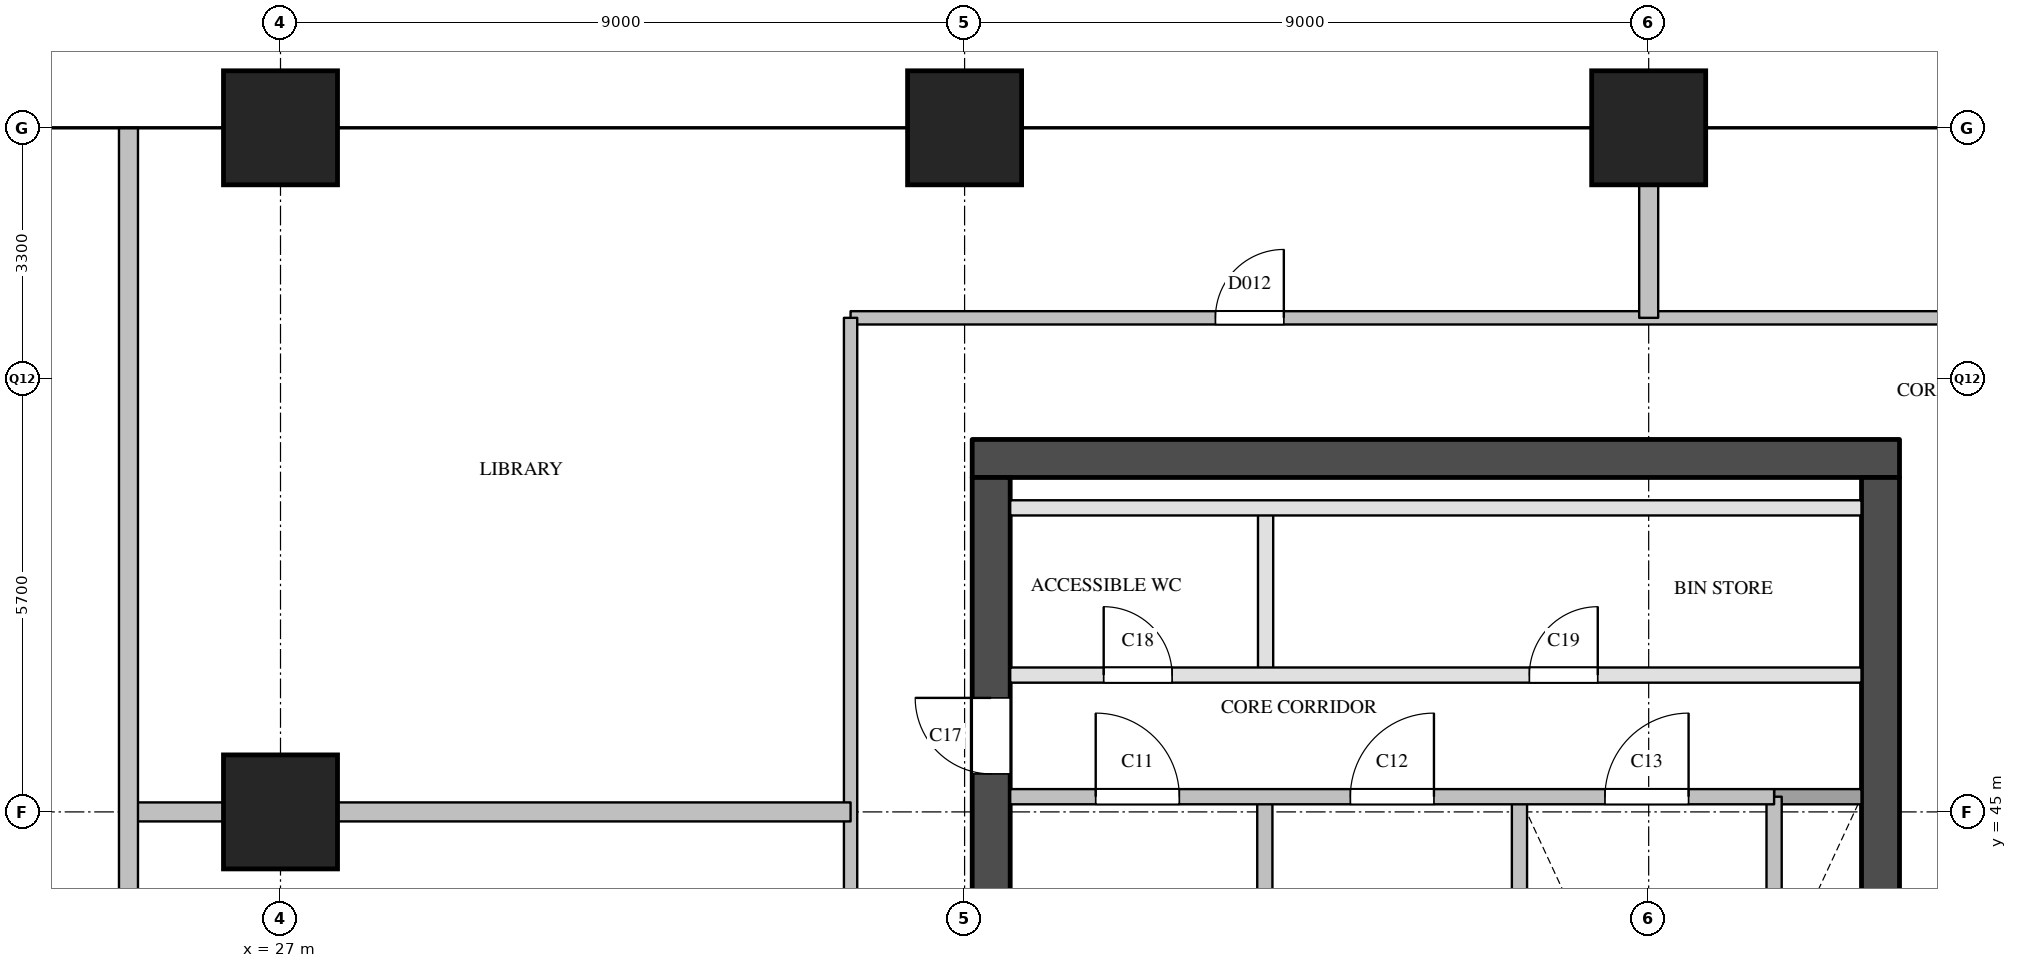
"""IFC4 building model, lengths in metres.
Left out: names, types, materials, properties, quantities, classifications, styles, units other than length and angle.
Written with IfcOpenShell. Run it as: python <this file> out.ifc"""

import sys

from ifc_helpers import new_model, si_unit, direction, frame, frame_2d, origin, origin_2d, place, context, subcontext, project, spatial, rectangle, extrude, element, fill, save


model = new_model("IFC4")
c1 = context("Model", 3, precision=1e-05, world=origin(), true_north=direction((0.0, 1.0)))
c2 = subcontext(c1, "Body", "Model", "MODEL_VIEW")
j1 = project(units=[si_unit("LENGTHUNIT", "METRE"), si_unit("PLANEANGLEUNIT", "RADIAN")], contexts=[c1])
p1 = place(None, origin())
s1 = spatial("IfcSite", under=j1, at=p1, CompositionType="ELEMENT")
p2 = place(p1, origin())
s2 = spatial("IfcBuilding", under=s1, at=p2, CompositionType="ELEMENT")
p3 = place(p2, frame((0.0, 0.0, 177.8)))
s3 = spatial("IfcBuildingStorey", under=s2, at=p3, CompositionType="ELEMENT", Elevation=177.8)
for number, where, z_axis, x_axis in (
    (1, (27.0, 45.0, 0.0), (0.0, 0.0, 1.0), (1.0, 0.0, 0.0)),
    (2, (27.0, 54.0, 0.0), (0.0, 0.0, 1.0), (1.0, 0.0, 0.0)),
    (3, (36.0, 54.0, 0.0), (0.0, 0.0, 1.0), (1.0, 0.0, 0.0)),
    (4, (45.0, 54.0, 0.0), (0.0, 0.0, 1.0), (1.0, 0.0, 0.0)),
):
    element("IfcColumn", number, at=place(p3, frame(where, z_axis=z_axis, x_axis=x_axis)), inside=s3, PredefinedType="COLUMN", context=c2, shape_type="SweptSolid", body=[
        extrude(rectangle(XDim=1.5, YDim=1.5, at=origin_2d()), origin(), (0.0, 0.0, 1.0), 3.9),
    ])
p4 = place(p3, frame((36.1, 49.65, 0.0), z_axis=(0.0, 0.0, 1.0), x_axis=(1.0, 0.0, 0.0)))
e5 = element("IfcWall", 5, at=p4, inside=s3, PredefinedType="SHEAR", context=c2, shape_type="SweptSolid", body=[
    extrude(rectangle(XDim=12.2, YDim=0.5, at=frame_2d((6.1, 0.0))), origin(), (0.0, 0.0, 1.0), 3.6),
])
p5 = place(p3, frame((36.35, 29.1, 0.0), z_axis=(0.0, 0.0, 1.0), x_axis=(0.0, 1.0, 0.0)))
e6 = element("IfcWall", 6, at=p5, inside=s3, PredefinedType="SHEAR", context=c2, shape_type="SweptSolid", body=[
    extrude(rectangle(XDim=20.3, YDim=0.5, at=frame_2d((10.15, 0.0))), origin(), (0.0, 0.0, 1.0), 3.6),
])
p6 = place(p5, frame((3.6, 0.0, 0.0)))
e7 = element("IfcOpeningElement", 7, at=p6, cuts=e6, PredefinedType="OPENING", context=c2, shape_type="SweptSolid", body=[
    extrude(rectangle(XDim=1.8, YDim=2.1, at=frame_2d((0.9, 1.05))), frame((0.0, 0.26, 0.0), z_axis=(0.0, -1.0, 0.0), x_axis=(1.0, 0.0, 0.0)), (0.0, 0.0, 1.0), 0.52),
])
p7 = place(p5, frame((16.4, 0.0, 0.0)))
e8 = element("IfcOpeningElement", 8, at=p7, cuts=e6, PredefinedType="OPENING", context=c2, shape_type="SweptSolid", body=[
    extrude(rectangle(XDim=1.0, YDim=2.1, at=frame_2d((0.5, 1.05))), frame((0.0, 0.26, 0.0), z_axis=(0.0, -1.0, 0.0), x_axis=(1.0, 0.0, 0.0)), (0.0, 0.0, 1.0), 0.52),
])
p8 = place(p3, frame((48.05, 29.1, 0.0), z_axis=(0.0, 0.0, 1.0), x_axis=(0.0, 1.0, 0.0)))
e9 = element("IfcWall", 9, at=p8, inside=s3, PredefinedType="SHEAR", context=c2, shape_type="SweptSolid", body=[
    extrude(rectangle(XDim=20.3, YDim=0.5, at=frame_2d((10.15, 0.0))), origin(), (0.0, 0.0, 1.0), 3.6),
])
p9 = place(p8, frame((12.5, 0.0, 0.0)))
e10 = element("IfcOpeningElement", 10, at=p9, cuts=e9, PredefinedType="OPENING", context=c2, shape_type="SweptSolid", body=[
    extrude(rectangle(XDim=0.7, YDim=2.1, at=frame_2d((0.35, 1.05))), frame((0.0, 0.26, 0.0), z_axis=(0.0, -1.0, 0.0), x_axis=(1.0, 0.0, 0.0)), (0.0, 0.0, 1.0), 0.52),
])
p10 = place(p8, frame((3.9, 0.0, 0.0)))
e11 = element("IfcOpeningElement", 11, at=p10, cuts=e9, PredefinedType="OPENING", context=c2, shape_type="SweptSolid", body=[
    extrude(rectangle(XDim=1.8, YDim=2.1, at=frame_2d((0.9, 1.05))), frame((0.0, 0.26, 0.0), z_axis=(0.0, -1.0, 0.0), x_axis=(1.0, 0.0, 0.0)), (0.0, 0.0, 1.0), 0.52),
])
p11 = place(p3, frame((39.95, 40.78, 0.0), z_axis=(0.0, 0.0, 1.0), x_axis=(0.0, 1.0, 0.0)))
e12 = element("IfcWall", 12, at=p11, inside=s3, PredefinedType="SOLIDWALL", context=c2, shape_type="SweptSolid", body=[
    extrude(rectangle(XDim=4.42, YDim=0.2, at=frame_2d((2.21, 0.0))), origin(), (0.0, 0.0, 1.0), 3.6),
])
p12 = place(p3, frame((39.96, 46.8, 0.0), z_axis=(0.0, 0.0, 1.0), x_axis=(0.0, 1.0, 0.0)))
e13 = element("IfcWall", 13, at=p12, inside=s3, PredefinedType="PARTITIONING", context=c2, shape_type="SweptSolid", body=[
    extrude(rectangle(XDim=2.2, YDim=0.2, at=frame_2d((1.1, 0.0))), origin(), (0.0, 0.0, 1.0), 3.6),
])
for number, where, z_axis, x_axis in (
    (14, (43.3, 40.78, 0.0), (0.0, 0.0, 1.0), (0.0, 1.0, 0.0)),
    (15, (46.65, 40.78, 0.0), (0.0, 0.0, 1.0), (0.0, 1.0, 0.0)),
):
    element("IfcWall", number, at=place(p3, frame(where, z_axis=z_axis, x_axis=x_axis)), inside=s3, PredefinedType="SOLIDWALL", context=c2, shape_type="SweptSolid", body=[
        extrude(rectangle(XDim=4.42, YDim=0.2, at=frame_2d((2.21, 0.0))), origin(), (0.0, 0.0, 1.0), 3.6),
    ])
p13 = place(p3, frame((46.65, 45.2, 0.0), z_axis=(0.0, 0.0, 1.0), x_axis=(1.0, 0.0, 0.0)))
e16 = element("IfcWall", 16, at=p13, inside=s3, PredefinedType="SOLIDWALL", context=c2, shape_type="SweptSolid", body=[
    extrude(rectangle(XDim=1.15, YDim=0.2, at=frame_2d((0.575, 0.0))), origin(), (0.0, 0.0, 1.0), 3.6),
])
p14 = place(p3, frame((36.6, 45.2, 0.0), z_axis=(0.0, 0.0, 1.0), x_axis=(1.0, 0.0, 0.0)))
e17 = element("IfcWall", 17, at=p14, inside=s3, PredefinedType="SOLIDWALL", context=c2, shape_type="SweptSolid", body=[
    extrude(rectangle(XDim=10.05, YDim=0.2, at=frame_2d((5.025, 0.0))), origin(), (0.0, 0.0, 1.0), 3.6),
])
p15 = place(p14, frame((1.125, 0.0, 0.0)))
e18 = element("IfcOpeningElement", 18, at=p15, cuts=e17, PredefinedType="OPENING", context=c2, shape_type="SweptSolid", body=[
    extrude(rectangle(XDim=1.1, YDim=2.1, at=frame_2d((0.55, 1.05))), frame((0.0, 0.11, 0.0), z_axis=(0.0, -1.0, 0.0), x_axis=(1.0, 0.0, 0.0)), (0.0, 0.0, 1.0), 0.22),
])
p16 = place(p14, frame((4.475, 0.0, 0.0)))
e19 = element("IfcOpeningElement", 19, at=p16, cuts=e17, PredefinedType="OPENING", context=c2, shape_type="SweptSolid", body=[
    extrude(rectangle(XDim=1.1, YDim=2.1, at=frame_2d((0.55, 1.05))), frame((0.0, 0.11, 0.0), z_axis=(0.0, -1.0, 0.0), x_axis=(1.0, 0.0, 0.0)), (0.0, 0.0, 1.0), 0.22),
])
p17 = place(p14, frame((7.825, 0.0, 0.0)))
e20 = element("IfcOpeningElement", 20, at=p17, cuts=e17, PredefinedType="OPENING", context=c2, shape_type="SweptSolid", body=[
    extrude(rectangle(XDim=1.1, YDim=2.1, at=frame_2d((0.55, 1.05))), frame((0.0, 0.11, 0.0), z_axis=(0.0, -1.0, 0.0), x_axis=(1.0, 0.0, 0.0)), (0.0, 0.0, 1.0), 0.22),
])
p18 = place(p3, frame((36.6, 46.8, 0.0), z_axis=(0.0, 0.0, 1.0), x_axis=(1.0, 0.0, 0.0)))
e21 = element("IfcWall", 21, at=p18, inside=s3, PredefinedType="PARTITIONING", context=c2, shape_type="SweptSolid", body=[
    extrude(rectangle(XDim=11.2, YDim=0.2, at=frame_2d((5.6, 0.0))), origin(), (0.0, 0.0, 1.0), 3.6),
])
p19 = place(p18, frame((1.23, 0.0, 0.0)))
e22 = element("IfcOpeningElement", 22, at=p19, cuts=e21, PredefinedType="OPENING", context=c2, shape_type="SweptSolid", body=[
    extrude(rectangle(XDim=0.9, YDim=2.1, at=frame_2d((0.45, 1.05))), frame((0.0, 0.11, 0.0), z_axis=(0.0, -1.0, 0.0), x_axis=(1.0, 0.0, 0.0)), (0.0, 0.0, 1.0), 0.22),
])
p20 = place(p18, frame((6.83, 0.0, 0.0)))
e23 = element("IfcOpeningElement", 23, at=p20, cuts=e21, PredefinedType="OPENING", context=c2, shape_type="SweptSolid", body=[
    extrude(rectangle(XDim=0.9, YDim=2.1, at=frame_2d((0.45, 1.05))), frame((0.0, 0.11, 0.0), z_axis=(0.0, -1.0, 0.0), x_axis=(1.0, 0.0, 0.0)), (0.0, 0.0, 1.0), 0.22),
])
p21 = place(p3, frame((36.6, 49.0, 0.0), z_axis=(0.0, 0.0, 1.0), x_axis=(1.0, 0.0, 0.0)))
e24 = element("IfcWall", 24, at=p21, inside=s3, PredefinedType="PARTITIONING", context=c2, shape_type="SweptSolid", body=[
    extrude(rectangle(XDim=11.2, YDim=0.2, at=frame_2d((5.6, 0.0))), origin(), (0.0, 0.0, 1.0), 3.6),
])
p22 = place(p3, frame((34.5, 51.5, 0.0), z_axis=(0.0, 0.0, 1.0), x_axis=(1.0, 0.0, 0.0)))
e25 = element("IfcWall", 25, at=p22, inside=s3, PredefinedType="PARTITIONING", context=c2, shape_type="SweptSolid", body=[
    extrude(rectangle(XDim=15.4, YDim=0.175, at=frame_2d((7.7, 0.0))), origin(), (0.0, 0.0, 1.0), 3.6),
])
p23 = place(p22, frame((4.8, 0.0, 0.0)))
e26 = element("IfcOpeningElement", 26, at=p23, cuts=e25, PredefinedType="OPENING", context=c2, shape_type="SweptSolid", body=[
    extrude(rectangle(XDim=0.9, YDim=2.1, at=frame_2d((0.45, 1.05))), frame((0.0, 0.097, 0.0), z_axis=(0.0, -1.0, 0.0), x_axis=(1.0, 0.0, 0.0)), (0.0, 0.0, 1.0), 0.195),
])
p24 = place(p3, frame((34.5, 28.5, 0.0), z_axis=(0.0, 0.0, 1.0), x_axis=(0.0, 1.0, 0.0)))
e27 = element("IfcWall", 27, at=p24, inside=s3, PredefinedType="PARTITIONING", context=c2, shape_type="SweptSolid", body=[
    extrude(rectangle(XDim=23.0, YDim=0.175, at=frame_2d((11.5, 0.0))), origin(), (0.0, 0.0, 1.0), 3.6),
])
p25 = place(p24, frame((5.1, 0.0, 0.0)))
e28 = element("IfcOpeningElement", 28, at=p25, cuts=e27, PredefinedType="OPENING", context=c2, shape_type="SweptSolid", body=[
    extrude(rectangle(XDim=1.0, YDim=2.1, at=frame_2d((0.5, 1.05))), frame((0.0, 0.097, 0.0), z_axis=(0.0, -1.0, 0.0), x_axis=(1.0, 0.0, 0.0)), (0.0, 0.0, 1.0), 0.195),
])
p26 = place(p24, frame((11.0, 0.0, 0.0)))
e29 = element("IfcOpeningElement", 29, at=p26, cuts=e27, PredefinedType="OPENING", context=c2, shape_type="SweptSolid", body=[
    extrude(rectangle(XDim=1.0, YDim=2.1, at=frame_2d((0.5, 1.05))), frame((0.0, 0.097, 0.0), z_axis=(0.0, -1.0, 0.0), x_axis=(1.0, 0.0, 0.0)), (0.0, 0.0, 1.0), 0.195),
])
p27 = place(p3, frame((25.0, 45.0, 0.0), z_axis=(0.0, 0.0, 1.0), x_axis=(1.0, 0.0, 0.0)))
e30 = element("IfcWall", 30, at=p27, inside=s3, PredefinedType="PARTITIONING", context=c2, shape_type="SweptSolid", body=[
    extrude(rectangle(XDim=9.5, YDim=0.25, at=frame_2d((4.75, 0.0))), origin(), (0.0, 0.0, 1.0), 3.6),
])
p28 = place(p3, frame((25.0, 27.0, 0.0), z_axis=(0.0, 0.0, 1.0), x_axis=(0.0, 1.0, 0.0)))
e31 = element("IfcWall", 31, at=p28, inside=s3, PredefinedType="PARTITIONING", context=c2, shape_type="SweptSolid", body=[
    extrude(rectangle(XDim=27.0, YDim=0.25, at=frame_2d((13.5, 0.0))), origin(), (0.0, 0.0, 1.0), 2.6),
])
p29 = place(p3, frame((45.0, 51.5, 0.0), z_axis=(0.0, 0.0, 1.0), x_axis=(0.0, 1.0, 0.0)))
e32 = element("IfcWall", 32, at=p29, inside=s3, PredefinedType="PARTITIONING", context=c2, shape_type="SweptSolid", body=[
    extrude(rectangle(XDim=2.5, YDim=0.25, at=frame_2d((1.25, 0.0))), origin(), (0.0, 0.0, 1.0), 3.6),
])
p30 = place(p15, origin())
e33 = element("IfcDoor", 33, at=p30, inside=s3, OperationType="SINGLE_SWING_LEFT", PredefinedType="DOOR", context=c2, shape_type="SweptSolid", body=[
    extrude(rectangle(XDim=1.1, YDim=2.1, at=frame_2d((0.55, 1.05))), frame((0.0, 0.025, 0.0), z_axis=(0.0, -1.0, 0.0), x_axis=(1.0, 0.0, 0.0)), (0.0, 0.0, 1.0), 0.05),
])
fill(e18, e33)
p31 = place(p16, origin())
e34 = element("IfcDoor", 34, at=p31, inside=s3, OperationType="SINGLE_SWING_RIGHT", PredefinedType="DOOR", context=c2, shape_type="SweptSolid", body=[
    extrude(rectangle(XDim=1.1, YDim=2.1, at=frame_2d((0.55, 1.05))), frame((0.0, 0.025, 0.0), z_axis=(0.0, -1.0, 0.0), x_axis=(1.0, 0.0, 0.0)), (0.0, 0.0, 1.0), 0.05),
])
fill(e19, e34)
p32 = place(p17, origin())
e35 = element("IfcDoor", 35, at=p32, inside=s3, OperationType="SINGLE_SWING_RIGHT", PredefinedType="DOOR", context=c2, shape_type="SweptSolid", body=[
    extrude(rectangle(XDim=1.1, YDim=2.1, at=frame_2d((0.55, 1.05))), frame((0.0, 0.025, 0.0), z_axis=(0.0, -1.0, 0.0), x_axis=(1.0, 0.0, 0.0)), (0.0, 0.0, 1.0), 0.05),
])
fill(e20, e35)
p33 = place(p7, origin())
e36 = element("IfcDoor", 36, at=p33, inside=s3, OperationType="SINGLE_SWING_RIGHT", PredefinedType="DOOR", context=c2, shape_type="SweptSolid", body=[
    extrude(rectangle(XDim=1.0, YDim=2.1, at=frame_2d((0.5, 1.05))), frame((0.0, 0.025, 0.0), z_axis=(0.0, -1.0, 0.0), x_axis=(1.0, 0.0, 0.0)), (0.0, 0.0, 1.0), 0.05),
])
fill(e8, e36)
p34 = place(p19, origin())
e37 = element("IfcDoor", 37, at=p34, inside=s3, OperationType="SINGLE_SWING_LEFT", PredefinedType="DOOR", context=c2, shape_type="SweptSolid", body=[
    extrude(rectangle(XDim=0.9, YDim=2.1, at=frame_2d((0.45, 1.05))), frame((0.0, 0.025, 0.0), z_axis=(0.0, -1.0, 0.0), x_axis=(1.0, 0.0, 0.0)), (0.0, 0.0, 1.0), 0.05),
])
fill(e22, e37)
p35 = place(p20, origin())
e38 = element("IfcDoor", 38, at=p35, inside=s3, OperationType="SINGLE_SWING_RIGHT", PredefinedType="DOOR", context=c2, shape_type="SweptSolid", body=[
    extrude(rectangle(XDim=0.9, YDim=2.1, at=frame_2d((0.45, 1.05))), frame((0.0, 0.025, 0.0), z_axis=(0.0, -1.0, 0.0), x_axis=(1.0, 0.0, 0.0)), (0.0, 0.0, 1.0), 0.05),
])
fill(e23, e38)
p36 = place(p23, origin())
e39 = element("IfcDoor", 39, at=p36, inside=s3, OperationType="SINGLE_SWING_RIGHT", PredefinedType="DOOR", context=c2, shape_type="SweptSolid", body=[
    extrude(rectangle(XDim=0.9, YDim=2.1, at=frame_2d((0.45, 1.05))), frame((0.0, 0.025, 0.0), z_axis=(0.0, -1.0, 0.0), x_axis=(1.0, 0.0, 0.0)), (0.0, 0.0, 1.0), 0.05),
])
fill(e26, e39)
save(model, sys.argv[1])
